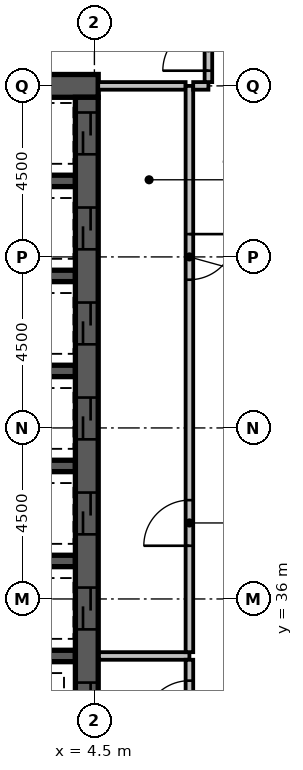
"""IFC4 building model, lengths in metres.
Left out: names, types, materials, properties, quantities, classifications, styles, units other than length and angle.
Written with IfcOpenShell. Run it as: python <this file> out.ifc"""

import sys

from ifc_helpers import new_model, si_unit, direction, frame, frame_2d, origin, place, context, subcontext, project, spatial, rectangle, extrude, element, fill, save


model = new_model("IFC4")
c1 = context("Model", 3, precision=1e-05, world=origin(), true_north=direction((0.0, 1.0)))
c2 = subcontext(c1, "Body", "Model", "MODEL_VIEW")
j1 = project(units=[si_unit("LENGTHUNIT", "METRE"), si_unit("PLANEANGLEUNIT", "RADIAN")], contexts=[c1])
p1 = place(None, origin())
s1 = spatial("IfcSite", under=j1, at=p1, CompositionType="ELEMENT")
p2 = place(p1, origin())
s2 = spatial("IfcBuilding", under=s1, at=p2, CompositionType="ELEMENT")
p3 = place(p2, frame((0.0, 0.0, 126.8)))
s3 = spatial("IfcBuildingStorey", under=s2, at=p3, CompositionType="ELEMENT", Elevation=126.8)
p4 = place(p3, frame((0.2, 49.5, -0.3), z_axis=(0.0, 0.0, 1.0), x_axis=(1.0, 0.0, 0.0)))
e1 = element("IfcWall", 1, at=p4, inside=s3, PredefinedType="SHEAR", context=c2, shape_type="SweptSolid", body=[
    extrude(rectangle(XDim=4.4, YDim=0.6, at=frame_2d((2.2, 0.0))), origin(), (0.0, 0.0, 1.0), 3.6),
])
for number, where, z_axis, x_axis in (
    (2, (0.8, 34.5, -0.3), (0.0, 0.0, 1.0), (1.0, 0.0, 0.0)),
    (3, (0.8, 37.0, -0.3), (0.0, 0.0, 1.0), (1.0, 0.0, 0.0)),
    (4, (0.8, 39.5, -0.3), (0.0, 0.0, 1.0), (1.0, 0.0, 0.0)),
    (5, (0.8, 42.0, -0.3), (0.0, 0.0, 1.0), (1.0, 0.0, 0.0)),
    (6, (0.8, 44.5, -0.3), (0.0, 0.0, 1.0), (1.0, 0.0, 0.0)),
    (7, (0.8, 47.0, -0.3), (0.0, 0.0, 1.0), (1.0, 0.0, 0.0)),
):
    element("IfcWall", number, at=place(p3, frame(where, z_axis=z_axis, x_axis=x_axis)), inside=s3, PredefinedType="SHEAR", context=c2, shape_type="SweptSolid", body=[
        extrude(rectangle(XDim=3.2, YDim=0.3, at=frame_2d((1.6, 0.0))), origin(), (0.0, 0.0, 1.0), 3.6),
    ])
p5 = place(p3, frame((4.3, 27.15, -0.3), z_axis=(0.0, 0.0, 1.0), x_axis=(0.0, 1.0, 0.0)))
e8 = element("IfcWall", 8, at=p5, inside=s3, PredefinedType="SHEAR", context=c2, shape_type="SweptSolid", body=[
    extrude(rectangle(XDim=22.05, YDim=0.6, at=frame_2d((11.025, 0.0))), origin(), (0.0, 0.0, 1.0), 3.6),
])
p6 = place(p5, frame((3.05, 0.0, 0.3)))
e9 = element("IfcOpeningElement", 9, at=p6, cuts=e8, PredefinedType="OPENING", context=c2, shape_type="SweptSolid", body=[
    extrude(rectangle(XDim=1.1, YDim=2.1, at=frame_2d((0.55, 1.05))), frame((0.0, 0.312, 0.0), z_axis=(0.0, -1.0, 0.0), x_axis=(1.0, 0.0, 0.0)), (0.0, 0.0, 1.0), 0.624),
])
p7 = place(p5, frame((0.55, 0.0, 0.3)))
e10 = element("IfcOpeningElement", 10, at=p7, cuts=e8, PredefinedType="OPENING", context=c2, shape_type="SweptSolid", body=[
    extrude(rectangle(XDim=1.1, YDim=2.1, at=frame_2d((0.55, 1.05))), frame((0.0, 0.312, 0.0), z_axis=(0.0, -1.0, 0.0), x_axis=(1.0, 0.0, 0.0)), (0.0, 0.0, 1.0), 0.624),
])
p8 = place(p5, frame((20.55, 0.0, 0.3)))
e11 = element("IfcOpeningElement", 11, at=p8, cuts=e8, PredefinedType="OPENING", context=c2, shape_type="SweptSolid", body=[
    extrude(rectangle(XDim=1.1, YDim=2.1, at=frame_2d((0.55, 1.05))), frame((0.0, 0.312, 0.0), z_axis=(0.0, -1.0, 0.0), x_axis=(1.0, 0.0, 0.0)), (0.0, 0.0, 1.0), 0.624),
])
p9 = place(p5, frame((18.05, 0.0, 0.3)))
e12 = element("IfcOpeningElement", 12, at=p9, cuts=e8, PredefinedType="OPENING", context=c2, shape_type="SweptSolid", body=[
    extrude(rectangle(XDim=1.1, YDim=2.1, at=frame_2d((0.55, 1.05))), frame((0.0, 0.312, 0.0), z_axis=(0.0, -1.0, 0.0), x_axis=(1.0, 0.0, 0.0)), (0.0, 0.0, 1.0), 0.624),
])
p10 = place(p5, frame((15.55, 0.0, 0.3)))
e13 = element("IfcOpeningElement", 13, at=p10, cuts=e8, PredefinedType="OPENING", context=c2, shape_type="SweptSolid", body=[
    extrude(rectangle(XDim=1.1, YDim=2.1, at=frame_2d((0.55, 1.05))), frame((0.0, 0.312, 0.0), z_axis=(0.0, -1.0, 0.0), x_axis=(1.0, 0.0, 0.0)), (0.0, 0.0, 1.0), 0.624),
])
p11 = place(p5, frame((13.05, 0.0, 0.3)))
e14 = element("IfcOpeningElement", 14, at=p11, cuts=e8, PredefinedType="OPENING", context=c2, shape_type="SweptSolid", body=[
    extrude(rectangle(XDim=1.1, YDim=2.1, at=frame_2d((0.55, 1.05))), frame((0.0, 0.312, 0.0), z_axis=(0.0, -1.0, 0.0), x_axis=(1.0, 0.0, 0.0)), (0.0, 0.0, 1.0), 0.624),
])
p12 = place(p5, frame((10.55, 0.0, 0.3)))
e15 = element("IfcOpeningElement", 15, at=p12, cuts=e8, PredefinedType="OPENING", context=c2, shape_type="SweptSolid", body=[
    extrude(rectangle(XDim=1.1, YDim=2.1, at=frame_2d((0.55, 1.05))), frame((0.0, 0.312, 0.0), z_axis=(0.0, -1.0, 0.0), x_axis=(1.0, 0.0, 0.0)), (0.0, 0.0, 1.0), 0.624),
])
p13 = place(p5, frame((8.05, 0.0, 0.3)))
e16 = element("IfcOpeningElement", 16, at=p13, cuts=e8, PredefinedType="OPENING", context=c2, shape_type="SweptSolid", body=[
    extrude(rectangle(XDim=1.1, YDim=2.1, at=frame_2d((0.55, 1.05))), frame((0.0, 0.312, 0.0), z_axis=(0.0, -1.0, 0.0), x_axis=(1.0, 0.0, 0.0)), (0.0, 0.0, 1.0), 0.624),
])
p14 = place(p5, frame((5.55, 0.0, 0.3)))
e17 = element("IfcOpeningElement", 17, at=p14, cuts=e8, PredefinedType="OPENING", context=c2, shape_type="SweptSolid", body=[
    extrude(rectangle(XDim=1.1, YDim=2.1, at=frame_2d((0.55, 1.05))), frame((0.0, 0.312, 0.0), z_axis=(0.0, -1.0, 0.0), x_axis=(1.0, 0.0, 0.0)), (0.0, 0.0, 1.0), 0.624),
])
p15 = place(p3, frame((4.62, 34.5, 0.0), z_axis=(0.0, 0.0, 1.0), x_axis=(1.0, 0.0, 0.0)))
e18 = element("IfcWall", 18, at=p15, inside=s3, PredefinedType="PARTITIONING", context=c2, shape_type="SweptSolid", body=[
    extrude(rectangle(XDim=2.38, YDim=0.2, at=frame_2d((1.19, 0.0))), origin(), (0.0, 0.0, 1.0), 3.3),
])
p16 = place(p3, frame((7.0, 34.6, 0.0), z_axis=(0.0, 0.0, 1.0), x_axis=(0.0, 1.0, 0.0)))
e19 = element("IfcWall", 19, at=p16, inside=s3, PredefinedType="PARTITIONING", context=c2, shape_type="SweptSolid", body=[
    extrude(rectangle(XDim=14.9, YDim=0.2, at=frame_2d((7.45, 0.0))), origin(), (0.0, 0.0, 1.0), 3.3),
])
p17 = place(p16, frame((2.8, 0.0, 0.0)))
e20 = element("IfcOpeningElement", 20, at=p17, cuts=e19, PredefinedType="OPENING", context=c2, shape_type="SweptSolid", body=[
    extrude(rectangle(XDim=1.2, YDim=2.1, at=frame_2d((0.6, 1.05))), frame((0.0, 0.112, 0.0), z_axis=(0.0, -1.0, 0.0), x_axis=(1.0, 0.0, 0.0)), (0.0, 0.0, 1.0), 0.224),
])
p18 = place(p16, frame((9.8, 0.0, 0.0)))
e21 = element("IfcOpeningElement", 21, at=p18, cuts=e19, PredefinedType="OPENING", context=c2, shape_type="SweptSolid", body=[
    extrude(rectangle(XDim=1.2, YDim=2.1, at=frame_2d((0.6, 1.05))), frame((0.0, 0.112, 0.0), z_axis=(0.0, -1.0, 0.0), x_axis=(1.0, 0.0, 0.0)), (0.0, 0.0, 1.0), 0.224),
])
p19 = place(p3, frame((4.6, 49.5, 0.0), z_axis=(0.0, 0.0, 1.0), x_axis=(1.0, 0.0, 0.0)))
e22 = element("IfcWall", 22, at=p19, inside=s3, PredefinedType="PARTITIONING", context=c2, shape_type="SweptSolid", body=[
    extrude(rectangle(XDim=2.3, YDim=0.2, at=frame_2d((1.15, 0.0))), origin(), (0.0, 0.0, 1.0), 3.3),
])
p20 = place(p3, frame((7.0, 32.1, 0.0), z_axis=(0.0, 0.0, 1.0), x_axis=(0.0, 1.0, 0.0)))
e23 = element("IfcWall", 23, at=p20, inside=s3, PredefinedType="PARTITIONING", context=c2, shape_type="SweptSolid", body=[
    extrude(rectangle(XDim=2.3, YDim=0.2, at=frame_2d((1.15, 0.0))), origin(), (0.0, 0.0, 1.0), 3.3),
])
p21 = place(p20, frame((0.55, 0.0, 0.0)))
e24 = element("IfcOpeningElement", 24, at=p21, cuts=e23, PredefinedType="OPENING", context=c2, shape_type="SweptSolid", body=[
    extrude(rectangle(XDim=1.2, YDim=2.1, at=frame_2d((0.6, 1.05))), frame((0.0, 0.112, 0.0), z_axis=(0.0, -1.0, 0.0), x_axis=(1.0, 0.0, 0.0)), (0.0, 0.0, 1.0), 0.224),
])
p22 = place(p3, frame((7.1, 49.5, 0.0), z_axis=(0.0, 0.0, 1.0), x_axis=(1.0, 0.0, 0.0)))
e25 = element("IfcWall", 25, at=p22, inside=s3, PredefinedType="PARTITIONING", context=c2, shape_type="SweptSolid", body=[
    extrude(rectangle(XDim=0.4, YDim=0.2, at=frame_2d((0.2, 0.0))), origin(), (0.0, 0.0, 1.0), 3.3),
])
p23 = place(p3, frame((7.5, 49.6, 0.0), z_axis=(0.0, 0.0, 1.0), x_axis=(0.0, 1.0, 0.0)))
e26 = element("IfcWall", 26, at=p23, inside=s3, PredefinedType="PARTITIONING", context=c2, shape_type="SweptSolid", body=[
    extrude(rectangle(XDim=3.9, YDim=0.2, at=frame_2d((1.95, 0.0))), origin(), (0.0, 0.0, 1.0), 3.3),
])
p24 = place(p23, frame((0.3, 0.0, 0.0)))
e27 = element("IfcOpeningElement", 27, at=p24, cuts=e26, PredefinedType="OPENING", context=c2, shape_type="SweptSolid", body=[
    extrude(rectangle(XDim=1.2, YDim=2.1, at=frame_2d((0.6, 1.05))), frame((0.0, 0.112, 0.0), z_axis=(0.0, -1.0, 0.0), x_axis=(1.0, 0.0, 0.0)), (0.0, 0.0, 1.0), 0.224),
])
p25 = place(p24, origin())
e28 = element("IfcDoor", 28, at=p25, inside=s3, OperationType="SINGLE_SWING_LEFT", PredefinedType="DOOR", context=c2, shape_type="SweptSolid", body=[
    extrude(rectangle(XDim=1.2, YDim=2.1, at=frame_2d((0.6, 1.05))), frame((0.0, 0.025, 0.0), z_axis=(0.0, -1.0, 0.0), x_axis=(1.0, 0.0, 0.0)), (0.0, 0.0, 1.0), 0.05),
])
fill(e27, e28)
p26 = place(p8, origin())
e29 = element("IfcDoor", 29, at=p26, inside=s3, OperationType="SLIDING_TO_LEFT", PredefinedType="DOOR", context=c2, shape_type="SweptSolid", body=[
    extrude(rectangle(XDim=1.1, YDim=2.1, at=frame_2d((0.55, 1.05))), frame((0.0, 0.025, 0.0), z_axis=(0.0, -1.0, 0.0), x_axis=(1.0, 0.0, 0.0)), (0.0, 0.0, 1.0), 0.05),
])
fill(e11, e29)
p27 = place(p9, origin())
e30 = element("IfcDoor", 30, at=p27, inside=s3, OperationType="SLIDING_TO_LEFT", PredefinedType="DOOR", context=c2, shape_type="SweptSolid", body=[
    extrude(rectangle(XDim=1.1, YDim=2.1, at=frame_2d((0.55, 1.05))), frame((0.0, 0.025, 0.0), z_axis=(0.0, -1.0, 0.0), x_axis=(1.0, 0.0, 0.0)), (0.0, 0.0, 1.0), 0.05),
])
fill(e12, e30)
p28 = place(p10, origin())
e31 = element("IfcDoor", 31, at=p28, inside=s3, OperationType="SLIDING_TO_LEFT", PredefinedType="DOOR", context=c2, shape_type="SweptSolid", body=[
    extrude(rectangle(XDim=1.1, YDim=2.1, at=frame_2d((0.55, 1.05))), frame((0.0, 0.025, 0.0), z_axis=(0.0, -1.0, 0.0), x_axis=(1.0, 0.0, 0.0)), (0.0, 0.0, 1.0), 0.05),
])
fill(e13, e31)
p29 = place(p11, origin())
e32 = element("IfcDoor", 32, at=p29, inside=s3, OperationType="SLIDING_TO_LEFT", PredefinedType="DOOR", context=c2, shape_type="SweptSolid", body=[
    extrude(rectangle(XDim=1.1, YDim=2.1, at=frame_2d((0.55, 1.05))), frame((0.0, 0.025, 0.0), z_axis=(0.0, -1.0, 0.0), x_axis=(1.0, 0.0, 0.0)), (0.0, 0.0, 1.0), 0.05),
])
fill(e14, e32)
p30 = place(p12, origin())
e33 = element("IfcDoor", 33, at=p30, inside=s3, OperationType="SLIDING_TO_LEFT", PredefinedType="DOOR", context=c2, shape_type="SweptSolid", body=[
    extrude(rectangle(XDim=1.1, YDim=2.1, at=frame_2d((0.55, 1.05))), frame((0.0, 0.025, 0.0), z_axis=(0.0, -1.0, 0.0), x_axis=(1.0, 0.0, 0.0)), (0.0, 0.0, 1.0), 0.05),
])
fill(e15, e33)
p31 = place(p13, origin())
e34 = element("IfcDoor", 34, at=p31, inside=s3, OperationType="SLIDING_TO_LEFT", PredefinedType="DOOR", context=c2, shape_type="SweptSolid", body=[
    extrude(rectangle(XDim=1.1, YDim=2.1, at=frame_2d((0.55, 1.05))), frame((0.0, 0.025, 0.0), z_axis=(0.0, -1.0, 0.0), x_axis=(1.0, 0.0, 0.0)), (0.0, 0.0, 1.0), 0.05),
])
fill(e16, e34)
p32 = place(p17, origin())
e35 = element("IfcDoor", 35, at=p32, inside=s3, OperationType="SINGLE_SWING_LEFT", PredefinedType="DOOR", context=c2, shape_type="SweptSolid", body=[
    extrude(rectangle(XDim=1.2, YDim=2.1, at=frame_2d((0.6, 1.05))), frame((0.0, 0.025, 0.0), z_axis=(0.0, -1.0, 0.0), x_axis=(1.0, 0.0, 0.0)), (0.0, 0.0, 1.0), 0.05),
])
fill(e20, e35)
p33 = place(p18, origin())
e36 = element("IfcDoor", 36, at=p33, inside=s3, OperationType="SINGLE_SWING_RIGHT", PredefinedType="DOOR", context=c2, shape_type="SweptSolid", body=[
    extrude(rectangle(XDim=1.2, YDim=2.1, at=frame_2d((0.6, 1.05))), frame((0.0, 0.025, 0.0), z_axis=(0.0, -1.0, 0.0), x_axis=(1.0, 0.0, 0.0)), (0.0, 0.0, 1.0), 0.05),
])
fill(e21, e36)
p34 = place(p21, origin())
e37 = element("IfcDoor", 37, at=p34, inside=s3, OperationType="SINGLE_SWING_LEFT", PredefinedType="DOOR", context=c2, shape_type="SweptSolid", body=[
    extrude(rectangle(XDim=1.2, YDim=2.1, at=frame_2d((0.6, 1.05))), frame((0.0, 0.025, 0.0), z_axis=(0.0, -1.0, 0.0), x_axis=(1.0, 0.0, 0.0)), (0.0, 0.0, 1.0), 0.05),
])
fill(e24, e37)
p35 = place(p14, origin())
e38 = element("IfcDoor", 38, at=p35, inside=s3, OperationType="SLIDING_TO_LEFT", PredefinedType="DOOR", context=c2, shape_type="SweptSolid", body=[
    extrude(rectangle(XDim=1.1, YDim=2.1, at=frame_2d((0.55, 1.05))), frame((0.0, 0.025, 0.0), z_axis=(0.0, -1.0, 0.0), x_axis=(1.0, 0.0, 0.0)), (0.0, 0.0, 1.0), 0.05),
])
fill(e17, e38)
save(model, sys.argv[1])
